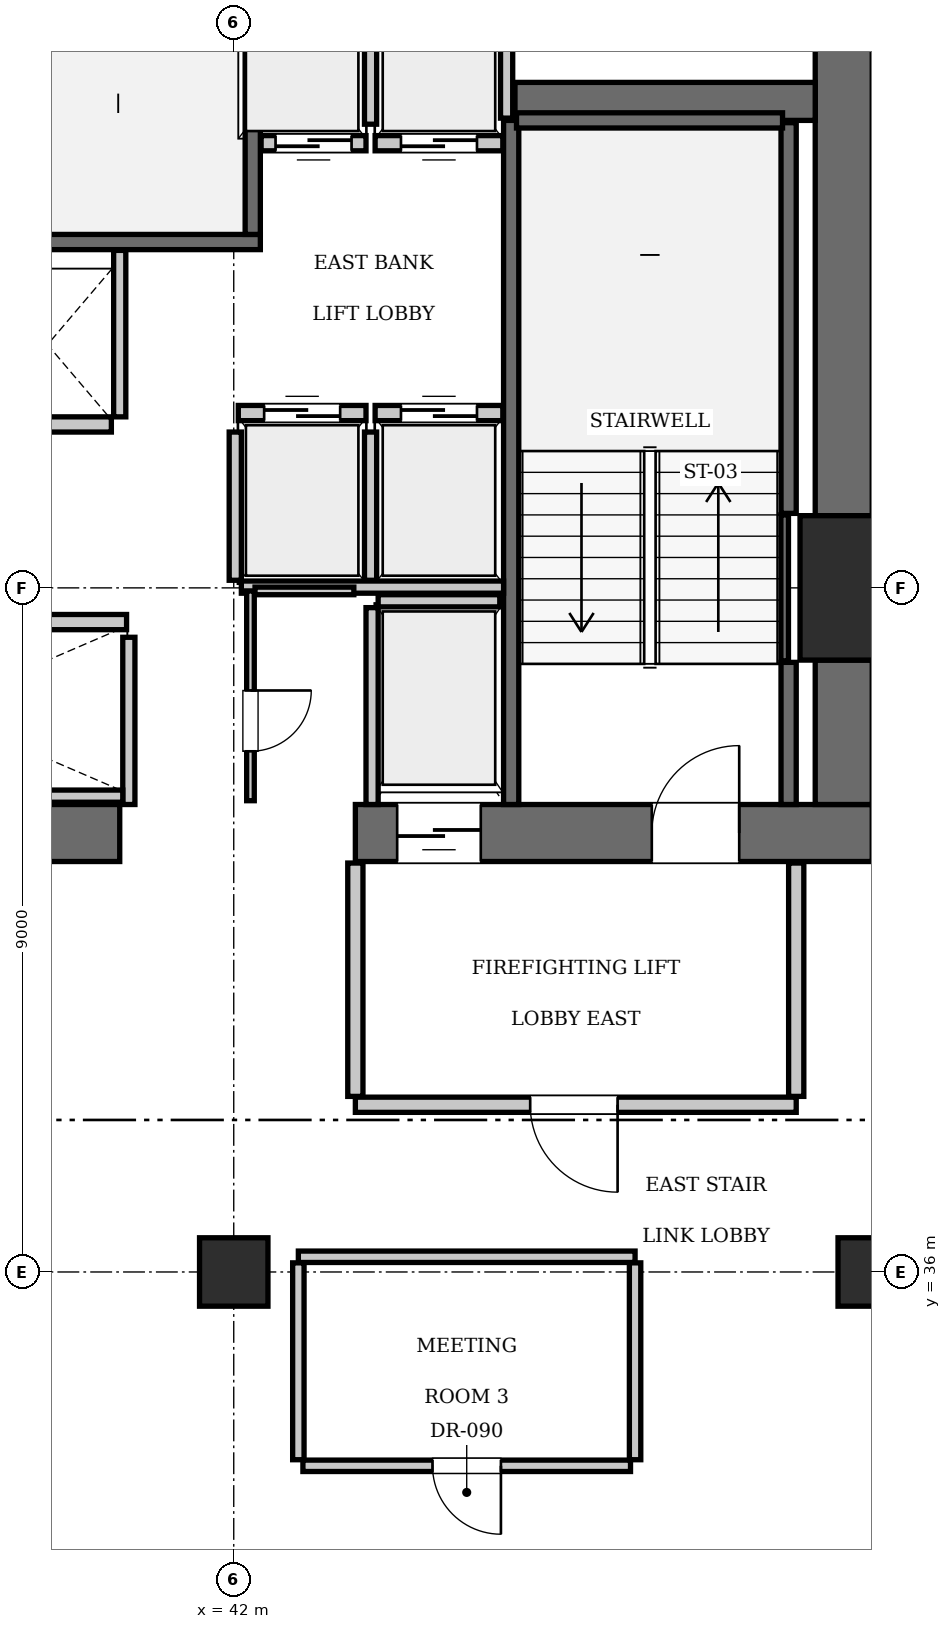
"""IFC4 building model, lengths in metres.
Left out: names, types, materials, properties, quantities, classifications, styles, units other than length and angle.
Written with IfcOpenShell. Run it as: python <this file> out.ifc"""

import sys

from ifc_helpers import new_model, si_unit, direction, frame, frame_2d, origin, origin_2d, place, context, subcontext, project, spatial, rectangle, extrude, element, fill, save


model = new_model("IFC4")
c1 = context("Model", 3, precision=1e-05, world=origin(), true_north=direction((0.0, 1.0)))
c2 = subcontext(c1, "Body", "Model", "MODEL_VIEW")
j1 = project(units=[si_unit("LENGTHUNIT", "METRE"), si_unit("PLANEANGLEUNIT", "RADIAN")], contexts=[c1])
p1 = place(None, origin())
s1 = spatial("IfcSite", under=j1, at=p1, CompositionType="ELEMENT")
p2 = place(p1, origin())
s2 = spatial("IfcBuilding", under=s1, at=p2, CompositionType="ELEMENT")
p3 = place(p2, frame((0.0, 0.0, 177.45)))
s3 = spatial("IfcBuildingStorey", under=s2, at=p3, CompositionType="ELEMENT", Elevation=177.45)
p4 = place(p3, frame((50.4, 45.0, 0.0), z_axis=(0.0, 0.0, 1.0), x_axis=(1.0, 0.0, 0.0)))
e1 = element("IfcColumn", 1, at=p4, inside=s3, PredefinedType="COLUMN", context=c2, shape_type="SweptSolid", body=[
    extrude(rectangle(XDim=1.9, YDim=1.9, at=origin_2d()), origin(), (0.0, 0.0, 1.0), 3.85),
])
p5 = place(p3, frame((35.1, 41.775, 0.0), z_axis=(0.0, 0.0, 1.0), x_axis=(1.0, 0.0, 0.0)))
e2 = element("IfcWall", 2, at=p5, inside=s3, PredefinedType="SHEAR", context=c2, shape_type="SweptSolid", body=[
    extrude(rectangle(XDim=5.4, YDim=0.75, at=frame_2d((2.7, 0.0))), origin(), (0.0, 0.0, 1.0), 3.85),
])
p6 = place(p3, frame((43.6, 41.775, 0.0), z_axis=(0.0, 0.0, 1.0), x_axis=(1.0, 0.0, 0.0)))
e3 = element("IfcWall", 3, at=p6, inside=s3, PredefinedType="SHEAR", context=c2, shape_type="SweptSolid", body=[
    extrude(rectangle(XDim=6.8, YDim=0.75, at=frame_2d((3.4, 0.0))), origin(), (0.0, 0.0, 1.0), 3.85),
])
p7 = place(p6, frame((3.9, 0.0, 0.0)))
e4 = element("IfcOpeningElement", 4, at=p7, cuts=e3, PredefinedType="OPENING", context=c2, shape_type="SweptSolid", body=[
    extrude(rectangle(XDim=1.15, YDim=2.15, at=frame_2d((0.575, 1.075))), frame((0.0, 0.385, 0.0), z_axis=(0.0, -1.0, 0.0), x_axis=(1.0, 0.0, 0.0)), (0.0, 0.0, 1.0), 0.77),
])
p8 = place(p6, frame((0.55, 0.0, 0.0)))
e5 = element("IfcOpeningElement", 5, at=p8, cuts=e3, PredefinedType="OPENING", context=c2, shape_type="SweptSolid", body=[
    extrude(rectangle(XDim=1.1, YDim=2.2, at=frame_2d((0.55, 1.1))), frame((0.0, 0.385, 0.0), z_axis=(0.0, -1.0, 0.0), x_axis=(1.0, 0.0, 0.0)), (0.0, 0.0, 1.0), 0.77),
])
p9 = place(p3, frame((50.025, 42.15, 0.0), z_axis=(0.0, 0.0, 1.0), x_axis=(0.0, 1.0, 0.0)))
e6 = element("IfcWall", 6, at=p9, inside=s3, PredefinedType="SHEAR", context=c2, shape_type="SweptSolid", body=[
    extrude(rectangle(XDim=1.9, YDim=0.75, at=frame_2d((0.95, 0.0))), origin(), (0.0, 0.0, 1.0), 3.85),
])
p10 = place(p3, frame((50.025, 45.95, 0.0), z_axis=(0.0, 0.0, 1.0), x_axis=(0.0, 1.0, 0.0)))
e7 = element("IfcWall", 7, at=p10, inside=s3, PredefinedType="SHEAR", context=c2, shape_type="SweptSolid", body=[
    extrude(rectangle(XDim=7.3, YDim=0.75, at=frame_2d((3.65, 0.0))), origin(), (0.0, 0.0, 1.0), 3.85),
])
p11 = place(p3, frame((45.7, 51.4, 0.0), z_axis=(0.0, 0.0, 1.0), x_axis=(1.0, 0.0, 0.0)))
e8 = element("IfcWall", 8, at=p11, inside=s3, PredefinedType="SHEAR", context=c2, shape_type="SweptSolid", body=[
    extrude(rectangle(XDim=3.95, YDim=0.5, at=frame_2d((1.975, 0.0))), origin(), (0.0, 0.0, 1.0), 3.85),
])
for number, where, z_axis, x_axis in (
    (9, (42.0, 36.0, 0.0), (0.0, 0.0, 1.0), (1.0, 0.0, 0.0)),
    (10, (50.4, 36.0, 0.0), (0.0, 0.0, 1.0), (1.0, 0.0, 0.0)),
):
    element("IfcColumn", number, at=place(p3, frame(where, z_axis=z_axis, x_axis=x_axis)), inside=s3, PredefinedType="COLUMN", context=c2, shape_type="SweptSolid", body=[
        extrude(rectangle(XDim=0.9, YDim=0.9, at=origin_2d()), origin(), (0.0, 0.0, 1.0), 3.85),
    ])
p12 = place(p3, frame((33.25, 49.55, 0.0), z_axis=(0.0, 0.0, 1.0), x_axis=(1.0, 0.0, 0.0)))
e11 = element("IfcWall", 11, at=p12, inside=s3, PredefinedType="SOLIDWALL", context=c2, shape_type="SweptSolid", body=[
    extrude(rectangle(XDim=9.1, YDim=0.2, at=frame_2d((4.55, 0.0))), origin(), (0.0, 0.0, 1.0), 3.61),
])
p13 = place(p3, frame((42.25, 49.65, 0.0), z_axis=(0.0, 0.0, 1.0), x_axis=(0.0, 1.0, 0.0)))
e12 = element("IfcWall", 12, at=p13, inside=s3, PredefinedType="SOLIDWALL", context=c2, shape_type="SweptSolid", body=[
    extrude(rectangle(XDim=3.6, YDim=0.2, at=frame_2d((1.8, 0.0))), origin(), (0.0, 0.0, 1.0), 3.61),
])
p14 = place(p3, frame((45.65, 42.15, 0.0), z_axis=(0.0, 0.0, 1.0), x_axis=(0.0, 1.0, 0.0)))
e13 = element("IfcWall", 13, at=p14, inside=s3, PredefinedType="SOLIDWALL", context=c2, shape_type="SweptSolid", body=[
    extrude(rectangle(XDim=9.0, YDim=0.2, at=frame_2d((4.5, 0.0))), origin(), (0.0, 0.0, 1.0), 3.61),
])
p15 = place(p3, frame((49.3, 42.15, 0.0), z_axis=(0.0, 0.0, 1.0), x_axis=(0.0, 1.0, 0.0)))
e14 = element("IfcWall", 14, at=p15, inside=s3, PredefinedType="SOLIDWALL", context=c2, shape_type="SweptSolid", body=[
    extrude(rectangle(XDim=1.87, YDim=0.2, at=frame_2d((0.935, 0.0))), origin(), (0.0, 0.0, 1.0), 3.61),
])
p16 = place(p3, frame((49.3, 45.98, 0.0), z_axis=(0.0, 0.0, 1.0), x_axis=(0.0, 1.0, 0.0)))
e15 = element("IfcWall", 15, at=p16, inside=s3, PredefinedType="SOLIDWALL", context=c2, shape_type="SweptSolid", body=[
    extrude(rectangle(XDim=5.14, YDim=0.2, at=frame_2d((2.57, 0.0))), origin(), (0.0, 0.0, 1.0), 3.61),
])
p17 = place(p3, frame((45.72, 51.15, 0.0), z_axis=(0.0, 0.0, 1.0), x_axis=(1.0, 0.0, 0.0)))
e16 = element("IfcWall", 16, at=p17, inside=s3, PredefinedType="SOLIDWALL", context=c2, shape_type="SweptSolid", body=[
    extrude(rectangle(XDim=3.5, YDim=0.2, at=frame_2d((1.75, 0.0))), origin(), (0.0, 0.0, 1.0), 3.61),
])
p18 = place(p3, frame((49.248, 44.04, 0.0), z_axis=(0.0, 0.0, 1.0), x_axis=(0.0, 1.0, 0.0)))
e17 = element("IfcWall", 17, at=p18, inside=s3, PredefinedType="SOLIDWALL", context=c2, shape_type="SweptSolid", body=[
    extrude(rectangle(XDim=1.92, YDim=0.1, at=frame_2d((0.96, 0.0))), origin(), (0.0, 0.0, 1.0), 3.61),
])
p19 = place(p3, frame((42.06, 47.3, 0.0), z_axis=(0.0, 0.0, 1.0), x_axis=(1.0, 0.0, 0.0)))
e18 = element("IfcWall", 18, at=p19, inside=s3, PredefinedType="SOLIDWALL", context=c2, shape_type="SweptSolid", body=[
    extrude(rectangle(XDim=1.68, YDim=0.2, at=frame_2d((0.84, 0.0))), origin(), (0.0, 0.0, 1.0), 3.61),
])
p20 = place(p19, frame((0.34, 0.0, 0.0)))
e19 = element("IfcOpeningElement", 19, at=p20, cuts=e18, PredefinedType="OPENING", context=c2, shape_type="SweptSolid", body=[
    extrude(rectangle(XDim=1.0, YDim=2.15, at=frame_2d((0.5, 1.075))), frame((0.0, 0.11, 0.0), z_axis=(0.0, -1.0, 0.0), x_axis=(1.0, 0.0, 0.0)), (0.0, 0.0, 1.0), 0.22),
])
p21 = place(p3, frame((43.86, 47.3, 0.0), z_axis=(0.0, 0.0, 1.0), x_axis=(1.0, 0.0, 0.0)))
e20 = element("IfcWall", 20, at=p21, inside=s3, PredefinedType="SOLIDWALL", context=c2, shape_type="SweptSolid", body=[
    extrude(rectangle(XDim=1.68, YDim=0.2, at=frame_2d((0.84, 0.0))), origin(), (0.0, 0.0, 1.0), 3.61),
])
p22 = place(p21, frame((0.34, 0.0, 0.0)))
e21 = element("IfcOpeningElement", 21, at=p22, cuts=e20, PredefinedType="OPENING", context=c2, shape_type="SweptSolid", body=[
    extrude(rectangle(XDim=1.0, YDim=2.15, at=frame_2d((0.5, 1.075))), frame((0.0, 0.11, 0.0), z_axis=(0.0, -1.0, 0.0), x_axis=(1.0, 0.0, 0.0)), (0.0, 0.0, 1.0), 0.22),
])
p23 = place(p3, frame((42.36, 50.85, 0.0), z_axis=(0.0, 0.0, 1.0), x_axis=(1.0, 0.0, 0.0)))
e22 = element("IfcWall", 22, at=p23, inside=s3, PredefinedType="SOLIDWALL", context=c2, shape_type="SweptSolid", body=[
    extrude(rectangle(XDim=1.38, YDim=0.2, at=frame_2d((0.69, 0.0))), origin(), (0.0, 0.0, 1.0), 3.61),
])
p24 = place(p23, frame((0.19, 0.0, 0.0)))
e23 = element("IfcOpeningElement", 23, at=p24, cuts=e22, PredefinedType="OPENING", context=c2, shape_type="SweptSolid", body=[
    extrude(rectangle(XDim=1.0, YDim=2.15, at=frame_2d((0.5, 1.075))), frame((0.0, 0.11, 0.0), z_axis=(0.0, -1.0, 0.0), x_axis=(1.0, 0.0, 0.0)), (0.0, 0.0, 1.0), 0.22),
])
p25 = place(p3, frame((43.86, 50.85, 0.0), z_axis=(0.0, 0.0, 1.0), x_axis=(1.0, 0.0, 0.0)))
e24 = element("IfcWall", 24, at=p25, inside=s3, PredefinedType="SOLIDWALL", context=c2, shape_type="SweptSolid", body=[
    extrude(rectangle(XDim=1.68, YDim=0.2, at=frame_2d((0.84, 0.0))), origin(), (0.0, 0.0, 1.0), 3.61),
])
p26 = place(p25, frame((0.34, 0.0, 0.0)))
e25 = element("IfcOpeningElement", 25, at=p26, cuts=e24, PredefinedType="OPENING", context=c2, shape_type="SweptSolid", body=[
    extrude(rectangle(XDim=1.0, YDim=2.15, at=frame_2d((0.5, 1.075))), frame((0.0, 0.11, 0.0), z_axis=(0.0, -1.0, 0.0), x_axis=(1.0, 0.0, 0.0)), (0.0, 0.0, 1.0), 0.22),
])
p27 = place(p3, frame((38.91, 44.55, 0.0), z_axis=(0.0, 0.0, 1.0), x_axis=(1.0, 0.0, 0.0)))
e26 = element("IfcWall", 26, at=p27, inside=s3, PredefinedType="SOLIDWALL", context=c2, shape_type="SweptSolid", body=[
    extrude(rectangle(XDim=1.68, YDim=0.2, at=frame_2d((0.84, 0.0))), origin(), (0.0, 0.0, 1.0), 3.61),
])
p28 = place(p3, frame((38.71, 47.15, 0.0), z_axis=(0.0, 0.0, 1.0), x_axis=(1.0, 0.0, 0.0)))
e27 = element("IfcWall", 27, at=p28, inside=s3, PredefinedType="SOLIDWALL", context=c2, shape_type="SweptSolid", body=[
    extrude(rectangle(XDim=1.68, YDim=0.2, at=frame_2d((0.84, 0.0))), origin(), (0.0, 0.0, 1.0), 3.61),
])
p29 = place(p3, frame((43.9, 44.83, 0.0), z_axis=(0.0, 0.0, 1.0), x_axis=(1.0, 0.0, 0.0)))
e28 = element("IfcWall", 28, at=p29, inside=s3, PredefinedType="SOLIDWALL", context=c2, shape_type="SweptSolid", body=[
    extrude(rectangle(XDim=1.6, YDim=0.16, at=frame_2d((0.8, 0.0))), origin(), (0.0, 0.0, 1.0), 3.61),
])
p30 = place(p3, frame((43.82, 42.15, 0.0), z_axis=(0.0, 0.0, 1.0), x_axis=(0.0, 1.0, 0.0)))
e29 = element("IfcWall", 29, at=p30, inside=s3, PredefinedType="SOLIDWALL", context=c2, shape_type="SweptSolid", body=[
    extrude(rectangle(XDim=2.59, YDim=0.16, at=frame_2d((1.295, 0.0))), origin(), (0.0, 0.0, 1.0), 3.61),
])
for number, where, z_axis, x_axis in (
    (30, (42.02, 45.1, 0.0), (0.0, 0.0, 1.0), (0.0, 1.0, 0.0)),
    (31, (43.8, 45.1, 0.0), (0.0, 0.0, 1.0), (0.0, 1.0, 0.0)),
):
    element("IfcWall", number, at=place(p3, frame(where, z_axis=z_axis, x_axis=x_axis)), inside=s3, PredefinedType="SOLIDWALL", context=c2, shape_type="SweptSolid", body=[
        extrude(rectangle(XDim=1.95, YDim=0.16, at=frame_2d((0.975, 0.0))), origin(), (0.0, 0.0, 1.0), 3.61),
    ])
p31 = place(p3, frame((42.1, 45.01, 0.0), z_axis=(0.0, 0.0, 1.0), x_axis=(1.0, 0.0, 0.0)))
e32 = element("IfcWall", 32, at=p31, inside=s3, PredefinedType="SOLIDWALL", context=c2, shape_type="SweptSolid", body=[
    extrude(rectangle(XDim=3.45, YDim=0.16, at=frame_2d((1.725, 0.0))), origin(), (0.0, 0.0, 1.0), 3.61),
])
p32 = place(p3, frame((45.59, 51.18, 0.0), z_axis=(0.0, 0.0, 1.0), x_axis=(0.0, 1.0, 0.0)))
e33 = element("IfcWall", 33, at=p32, inside=s3, PredefinedType="SOLIDWALL", context=c2, shape_type="SweptSolid", body=[
    extrude(rectangle(XDim=2.07, YDim=0.16, at=frame_2d((1.035, 0.0))), origin(), (0.0, 0.0, 1.0), 3.61),
])
p33 = place(p3, frame((43.8, 51.1, 0.0), z_axis=(0.0, 0.0, 1.0), x_axis=(0.0, 1.0, 0.0)))
e34 = element("IfcWall", 34, at=p33, inside=s3, PredefinedType="SOLIDWALL", context=c2, shape_type="SweptSolid", body=[
    extrude(rectangle(XDim=2.15, YDim=0.16, at=frame_2d((1.075, 0.0))), origin(), (0.0, 0.0, 1.0), 3.61),
])
p34 = place(p3, frame((40.62, 42.15, 0.0), z_axis=(0.0, 0.0, 1.0), x_axis=(0.0, 1.0, 0.0)))
e35 = element("IfcWall", 35, at=p34, inside=s3, PredefinedType="SOLIDWALL", context=c2, shape_type="SweptSolid", body=[
    extrude(rectangle(XDim=2.2, YDim=0.16, at=frame_2d((1.1, 0.0))), origin(), (0.0, 0.0, 1.0), 3.61),
])
p35 = place(p3, frame((35.52, 42.26, 0.0), z_axis=(0.0, 0.0, 1.0), x_axis=(1.0, 0.0, 0.0)))
e36 = element("IfcWall", 36, at=p35, inside=s3, PredefinedType="SOLIDWALL", context=c2, shape_type="SweptSolid", body=[
    extrude(rectangle(XDim=5.02, YDim=0.16, at=frame_2d((2.51, 0.0))), origin(), (0.0, 0.0, 1.0), 3.61),
])
p36 = place(p3, frame((40.5, 47.25, 0.0), z_axis=(0.0, 0.0, 1.0), x_axis=(0.0, 1.0, 0.0)))
e37 = element("IfcWall", 37, at=p36, inside=s3, PredefinedType="SOLIDWALL", context=c2, shape_type="SweptSolid", body=[
    extrude(rectangle(XDim=2.19, YDim=0.16, at=frame_2d((1.095, 0.0))), origin(), (0.0, 0.0, 1.0), 3.61),
])
p37 = place(p3, frame((43.6, 38.2, 0.0), z_axis=(0.0, 0.0, 1.0), x_axis=(1.0, 0.0, 0.0)))
e38 = element("IfcWall", 38, at=p37, inside=s3, PredefinedType="PARTITIONING", context=c2, shape_type="SweptSolid", body=[
    extrude(rectangle(XDim=5.8, YDim=0.2, at=frame_2d((2.9, 0.0))), origin(), (0.0, 0.0, 1.0), 3.61),
])
p38 = place(p37, frame((2.3, 0.0, 0.0)))
e39 = element("IfcOpeningElement", 39, at=p38, cuts=e38, PredefinedType="OPENING", context=c2, shape_type="SweptSolid", body=[
    extrude(rectangle(XDim=1.15, YDim=2.15, at=frame_2d((0.575, 1.075))), frame((0.0, 0.11, 0.0), z_axis=(0.0, -1.0, 0.0), x_axis=(1.0, 0.0, 0.0)), (0.0, 0.0, 1.0), 0.22),
])
for number, where, z_axis, x_axis in (
    (40, (43.6, 38.31, 0.0), (0.0, 0.0, 1.0), (0.0, 1.0, 0.0)),
    (41, (49.4, 38.31, 0.0), (0.0, 0.0, 1.0), (0.0, 1.0, 0.0)),
):
    element("IfcWall", number, at=place(p3, frame(where, z_axis=z_axis, x_axis=x_axis)), inside=s3, PredefinedType="PARTITIONING", context=c2, shape_type="SweptSolid", body=[
        extrude(rectangle(XDim=3.07, YDim=0.2, at=frame_2d((1.535, 0.0))), origin(), (0.0, 0.0, 1.0), 3.61),
    ])
p39 = place(p3, frame((42.22, 42.2, 0.0), z_axis=(0.0, 0.0, 1.0), x_axis=(0.0, 1.0, 0.0)))
e42 = element("IfcWall", 42, at=p39, inside=s3, PredefinedType="PARTITIONING", context=c2, shape_type="SweptSolid", body=[
    extrude(rectangle(XDim=2.76, YDim=0.1, at=frame_2d((1.38, 0.0))), origin(), (0.0, 0.0, 1.0), 3.61),
])
p40 = place(p39, frame((0.65, 0.0, 0.0)))
e43 = element("IfcOpeningElement", 43, at=p40, cuts=e42, PredefinedType="OPENING", context=c2, shape_type="SweptSolid", body=[
    extrude(rectangle(XDim=0.8, YDim=2.05, at=frame_2d((0.4, 1.025))), frame((0.0, 0.06, 0.0), z_axis=(0.0, -1.0, 0.0), x_axis=(1.0, 0.0, 0.0)), (0.0, 0.0, 1.0), 0.12),
])
p41 = place(p3, frame((42.28, 44.96, 0.0), z_axis=(0.0, 0.0, 1.0), x_axis=(1.0, 0.0, 0.0)))
e44 = element("IfcWall", 44, at=p41, inside=s3, PredefinedType="PARTITIONING", context=c2, shape_type="SweptSolid", body=[
    extrude(rectangle(XDim=1.3, YDim=0.1, at=frame_2d((0.65, 0.0))), origin(), (0.0, 0.0, 1.0), 3.61),
])
p42 = place(p3, frame((42.85, 36.2, 0.0), z_axis=(0.0, 0.0, 1.0), x_axis=(1.0, 0.0, 0.0)))
e45 = element("IfcWall", 45, at=p42, inside=s3, PredefinedType="PARTITIONING", context=c2, shape_type="SweptSolid", body=[
    extrude(rectangle(XDim=4.43, YDim=0.15, at=frame_2d((2.215, 0.0))), origin(), (0.0, 0.0, 1.0), 3.61),
])
for number, where, z_axis, x_axis in (
    (46, (42.85, 33.53, 0.0), (0.0, 0.0, 1.0), (0.0, 1.0, 0.0)),
    (47, (47.28, 33.53, 0.0), (0.0, 0.0, 1.0), (0.0, 1.0, 0.0)),
):
    element("IfcWall", number, at=place(p3, frame(where, z_axis=z_axis, x_axis=x_axis)), inside=s3, PredefinedType="PARTITIONING", context=c2, shape_type="SweptSolid", body=[
        extrude(rectangle(XDim=2.59, YDim=0.15, at=frame_2d((1.295, 0.0))), origin(), (0.0, 0.0, 1.0), 3.61),
    ])
p43 = place(p3, frame((42.91, 33.45, 0.0), z_axis=(0.0, 0.0, 1.0), x_axis=(1.0, 0.0, 0.0)))
e48 = element("IfcWall", 48, at=p43, inside=s3, PredefinedType="PARTITIONING", context=c2, shape_type="SweptSolid", body=[
    extrude(rectangle(XDim=4.31, YDim=0.15, at=frame_2d((2.155, 0.0))), origin(), (0.0, 0.0, 1.0), 3.61),
])
p44 = place(p43, frame((1.705, 0.0, 0.0)))
e49 = element("IfcOpeningElement", 49, at=p44, cuts=e48, PredefinedType="OPENING", context=c2, shape_type="SweptSolid", body=[
    extrude(rectangle(XDim=0.9, YDim=2.1, at=frame_2d((0.45, 1.05))), frame((0.0, 0.085, 0.0), z_axis=(0.0, -1.0, 0.0), x_axis=(1.0, 0.0, 0.0)), (0.0, 0.0, 1.0), 0.17),
])
p45 = place(p7, origin())
e50 = element("IfcDoor", 50, at=p45, inside=s3, OperationType="SINGLE_SWING_RIGHT", PredefinedType="DOOR", context=c2, shape_type="SweptSolid", body=[
    extrude(rectangle(XDim=1.15, YDim=2.15, at=frame_2d((0.575, 1.075))), frame((0.0, 0.025, 0.0), z_axis=(0.0, -1.0, 0.0), x_axis=(1.0, 0.0, 0.0)), (0.0, 0.0, 1.0), 0.05),
])
fill(e4, e50)
p46 = place(p20, origin())
e51 = element("IfcDoor", 51, at=p46, inside=s3, OperationType="SLIDING_TO_LEFT", PredefinedType="DOOR", context=c2, shape_type="SweptSolid", body=[
    extrude(rectangle(XDim=1.0, YDim=2.15, at=frame_2d((0.5, 1.075))), frame((0.0, 0.025, 0.0), z_axis=(0.0, -1.0, 0.0), x_axis=(1.0, 0.0, 0.0)), (0.0, 0.0, 1.0), 0.05),
])
fill(e19, e51)
p47 = place(p22, origin())
e52 = element("IfcDoor", 52, at=p47, inside=s3, OperationType="SLIDING_TO_LEFT", PredefinedType="DOOR", context=c2, shape_type="SweptSolid", body=[
    extrude(rectangle(XDim=1.0, YDim=2.15, at=frame_2d((0.5, 1.075))), frame((0.0, 0.025, 0.0), z_axis=(0.0, -1.0, 0.0), x_axis=(1.0, 0.0, 0.0)), (0.0, 0.0, 1.0), 0.05),
])
fill(e21, e52)
p48 = place(p24, frame((1.0, 0.0, 0.0), z_axis=(0.0, 0.0, 1.0), x_axis=(-1.0, 0.0, 0.0)))
e53 = element("IfcDoor", 53, at=p48, inside=s3, OperationType="SLIDING_TO_LEFT", PredefinedType="DOOR", context=c2, shape_type="SweptSolid", body=[
    extrude(rectangle(XDim=1.0, YDim=2.15, at=frame_2d((0.5, 1.075))), frame((0.0, 0.025, 0.0), z_axis=(0.0, -1.0, 0.0), x_axis=(1.0, 0.0, 0.0)), (0.0, 0.0, 1.0), 0.05),
])
fill(e23, e53)
p49 = place(p26, frame((1.0, 0.0, 0.0), z_axis=(0.0, 0.0, 1.0), x_axis=(-1.0, 0.0, 0.0)))
e54 = element("IfcDoor", 54, at=p49, inside=s3, OperationType="SLIDING_TO_LEFT", PredefinedType="DOOR", context=c2, shape_type="SweptSolid", body=[
    extrude(rectangle(XDim=1.0, YDim=2.15, at=frame_2d((0.5, 1.075))), frame((0.0, 0.025, 0.0), z_axis=(0.0, -1.0, 0.0), x_axis=(1.0, 0.0, 0.0)), (0.0, 0.0, 1.0), 0.05),
])
fill(e25, e54)
p50 = place(p8, frame((1.1, 0.0, 0.0), z_axis=(0.0, 0.0, 1.0), x_axis=(-1.0, 0.0, 0.0)))
e55 = element("IfcDoor", 55, at=p50, inside=s3, OperationType="SLIDING_TO_LEFT", PredefinedType="DOOR", context=c2, shape_type="SweptSolid", body=[
    extrude(rectangle(XDim=1.1, YDim=2.2, at=frame_2d((0.55, 1.1))), frame((0.0, 0.025, 0.0), z_axis=(0.0, -1.0, 0.0), x_axis=(1.0, 0.0, 0.0)), (0.0, 0.0, 1.0), 0.05),
])
fill(e5, e55)
p51 = place(p38, frame((1.15, 0.0, 0.0), z_axis=(0.0, 0.0, 1.0), x_axis=(-1.0, 0.0, 0.0)))
e56 = element("IfcDoor", 56, at=p51, inside=s3, OperationType="SINGLE_SWING_LEFT", PredefinedType="DOOR", context=c2, shape_type="SweptSolid", body=[
    extrude(rectangle(XDim=1.15, YDim=2.15, at=frame_2d((0.575, 1.075))), frame((0.0, 0.025, 0.0), z_axis=(0.0, -1.0, 0.0), x_axis=(1.0, 0.0, 0.0)), (0.0, 0.0, 1.0), 0.05),
])
fill(e39, e56)
p52 = place(p40, frame((0.8, 0.0, 0.0), z_axis=(0.0, 0.0, 1.0), x_axis=(-1.0, 0.0, 0.0)))
e57 = element("IfcDoor", 57, at=p52, inside=s3, OperationType="SINGLE_SWING_LEFT", PredefinedType="DOOR", context=c2, shape_type="SweptSolid", body=[
    extrude(rectangle(XDim=0.8, YDim=2.05, at=frame_2d((0.4, 1.025))), frame((0.0, 0.025, 0.0), z_axis=(0.0, -1.0, 0.0), x_axis=(1.0, 0.0, 0.0)), (0.0, 0.0, 1.0), 0.05),
])
fill(e43, e57)
p53 = place(p44, frame((0.9, 0.0, 0.0), z_axis=(0.0, 0.0, 1.0), x_axis=(-1.0, 0.0, 0.0)))
e58 = element("IfcDoor", 58, at=p53, inside=s3, OperationType="SINGLE_SWING_LEFT", PredefinedType="DOOR", context=c2, shape_type="SweptSolid", body=[
    extrude(rectangle(XDim=0.9, YDim=2.1, at=frame_2d((0.45, 1.05))), frame((0.0, 0.025, 0.0), z_axis=(0.0, -1.0, 0.0), x_axis=(1.0, 0.0, 0.0)), (0.0, 0.0, 1.0), 0.05),
])
fill(e49, e58)
save(model, sys.argv[1])
